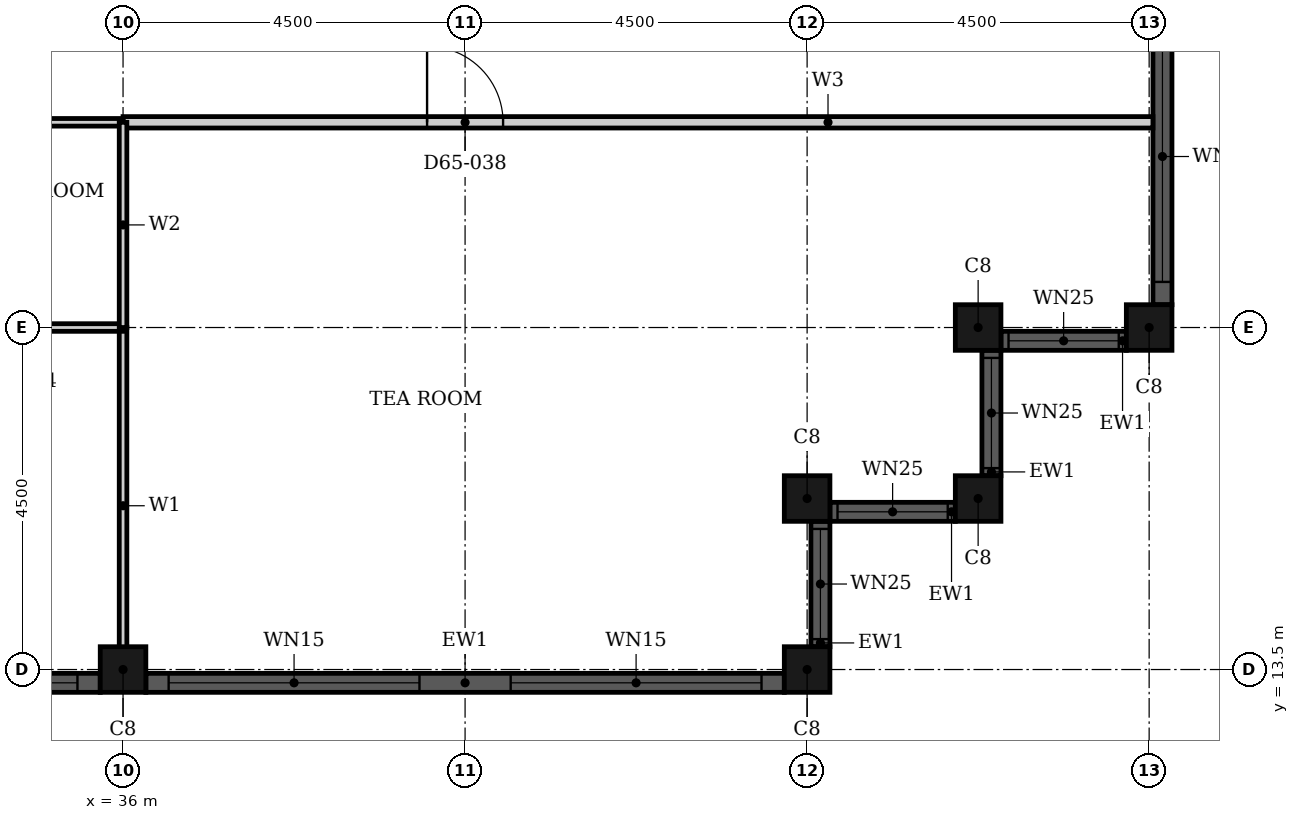
"""IFC4 building model, lengths in metres.
Left out: names, types, materials, properties, quantities, classifications, styles, units other than length and angle.
Written with IfcOpenShell. Run it as: python <this file> out.ifc"""

import sys

from ifc_helpers import new_model, si_unit, direction, frame, frame_2d, origin, origin_2d, place, context, subcontext, project, spatial, rectangle, hollow_rectangle, extrude, element, fill, save


model = new_model("IFC4")
c1 = context("Model", 3, precision=1e-05, world=origin(), true_north=direction((0.0, 1.0)))
c2 = subcontext(c1, "Body", "Model", "MODEL_VIEW")
j1 = project(units=[si_unit("LENGTHUNIT", "METRE"), si_unit("PLANEANGLEUNIT", "RADIAN")], contexts=[c1])
p1 = place(None, origin())
s1 = spatial("IfcSite", under=j1, at=p1, CompositionType="ELEMENT")
p2 = place(p1, origin())
s2 = spatial("IfcBuilding", under=s1, at=p2, CompositionType="ELEMENT")
p3 = place(p2, frame((0.0, 0.0, 256.4)))
s3 = spatial("IfcBuildingStorey", under=s2, at=p3, CompositionType="ELEMENT", Elevation=256.4)
for number, where, z_axis, x_axis in (
    (1, (36.0, 13.5, 0.0), (0.0, 0.0, 1.0), (1.0, 0.0, 0.0)),
    (2, (45.0, 13.5, 0.0), (0.0, 0.0, 1.0), (1.0, 0.0, 0.0)),
    (3, (45.0, 15.75, 0.0), (0.0, 0.0, 1.0), (1.0, 0.0, 0.0)),
    (4, (47.25, 15.75, 0.0), (0.0, 0.0, 1.0), (1.0, 0.0, 0.0)),
    (5, (47.25, 18.0, 0.0), (0.0, 0.0, 1.0), (1.0, 0.0, 0.0)),
    (6, (49.5, 18.0, 0.0), (0.0, 0.0, 1.0), (1.0, 0.0, 0.0)),
):
    element("IfcColumn", number, at=place(p3, frame(where, z_axis=z_axis, x_axis=x_axis)), inside=s3, PredefinedType="COLUMN", context=c2, shape_type="SweptSolid", body=[
        extrude(hollow_rectangle(XDim=0.6, YDim=0.6, WallThickness=0.02, at=origin_2d()), origin(), (0.0, 0.0, 1.0), 3.7),
    ])
p4 = place(p3, frame((27.3, 13.325, 0.0), z_axis=(0.0, 0.0, 1.0), x_axis=(1.0, 0.0, 0.0)))
e7 = element("IfcWall", 7, at=p4, inside=s3, PredefinedType="SOLIDWALL", context=c2, shape_type="SweptSolid", body=[
    extrude(rectangle(XDim=8.4, YDim=0.25, at=frame_2d((4.2, 0.0))), origin(), (0.0, 0.0, 1.0), 3.7),
])
p5 = place(p4, frame((0.3, 0.0, 0.45)))
e8 = element("IfcOpeningElement", 8, at=p5, cuts=e7, PredefinedType="OPENING", context=c2, shape_type="SweptSolid", body=[
    extrude(rectangle(XDim=3.3, YDim=2.3, at=frame_2d((1.65, 1.15))), frame((0.0, 0.135, 0.0), z_axis=(0.0, -1.0, 0.0), x_axis=(1.0, 0.0, 0.0)), (0.0, 0.0, 1.0), 0.27),
])
p6 = place(p4, frame((4.8, 0.0, 0.45)))
e9 = element("IfcOpeningElement", 9, at=p6, cuts=e7, PredefinedType="OPENING", context=c2, shape_type="SweptSolid", body=[
    extrude(rectangle(XDim=3.3, YDim=2.3, at=frame_2d((1.65, 1.15))), frame((0.0, 0.135, 0.0), z_axis=(0.0, -1.0, 0.0), x_axis=(1.0, 0.0, 0.0)), (0.0, 0.0, 1.0), 0.27),
])
p7 = place(p3, frame((36.3, 13.325, 0.0), z_axis=(0.0, 0.0, 1.0), x_axis=(1.0, 0.0, 0.0)))
e10 = element("IfcWall", 10, at=p7, inside=s3, PredefinedType="SOLIDWALL", context=c2, shape_type="SweptSolid", body=[
    extrude(rectangle(XDim=8.4, YDim=0.25, at=frame_2d((4.2, 0.0))), origin(), (0.0, 0.0, 1.0), 3.7),
])
p8 = place(p7, frame((0.3, 0.0, 0.45)))
e11 = element("IfcOpeningElement", 11, at=p8, cuts=e10, PredefinedType="OPENING", context=c2, shape_type="SweptSolid", body=[
    extrude(rectangle(XDim=3.3, YDim=2.3, at=frame_2d((1.65, 1.15))), frame((0.0, 0.135, 0.0), z_axis=(0.0, -1.0, 0.0), x_axis=(1.0, 0.0, 0.0)), (0.0, 0.0, 1.0), 0.27),
])
p9 = place(p7, frame((4.8, 0.0, 0.45)))
e12 = element("IfcOpeningElement", 12, at=p9, cuts=e10, PredefinedType="OPENING", context=c2, shape_type="SweptSolid", body=[
    extrude(rectangle(XDim=3.3, YDim=2.3, at=frame_2d((1.65, 1.15))), frame((0.0, 0.135, 0.0), z_axis=(0.0, -1.0, 0.0), x_axis=(1.0, 0.0, 0.0)), (0.0, 0.0, 1.0), 0.27),
])
p10 = place(p3, frame((45.175, 13.8, 0.0), z_axis=(0.0, 0.0, 1.0), x_axis=(0.0, 1.0, 0.0)))
e13 = element("IfcWall", 13, at=p10, inside=s3, PredefinedType="SOLIDWALL", context=c2, shape_type="SweptSolid", body=[
    extrude(rectangle(XDim=1.65, YDim=0.25, at=frame_2d((0.825, 0.0))), origin(), (0.0, 0.0, 1.0), 3.7),
])
p11 = place(p10, frame((0.1, 0.0, 0.9)))
e14 = element("IfcOpeningElement", 14, at=p11, cuts=e13, PredefinedType="OPENING", context=c2, shape_type="SweptSolid", body=[
    extrude(rectangle(XDim=1.45, YDim=1.85, at=frame_2d((0.725, 0.925))), frame((0.0, 0.135, 0.0), z_axis=(0.0, -1.0, 0.0), x_axis=(1.0, 0.0, 0.0)), (0.0, 0.0, 1.0), 0.27),
])
p12 = place(p3, frame((45.3, 15.575, 0.0), z_axis=(0.0, 0.0, 1.0), x_axis=(1.0, 0.0, 0.0)))
e15 = element("IfcWall", 15, at=p12, inside=s3, PredefinedType="SOLIDWALL", context=c2, shape_type="SweptSolid", body=[
    extrude(rectangle(XDim=1.65, YDim=0.25, at=frame_2d((0.825, 0.0))), origin(), (0.0, 0.0, 1.0), 3.7),
])
p13 = place(p12, frame((0.1, 0.0, 0.9)))
e16 = element("IfcOpeningElement", 16, at=p13, cuts=e15, PredefinedType="OPENING", context=c2, shape_type="SweptSolid", body=[
    extrude(rectangle(XDim=1.45, YDim=1.85, at=frame_2d((0.725, 0.925))), frame((0.0, 0.135, 0.0), z_axis=(0.0, -1.0, 0.0), x_axis=(1.0, 0.0, 0.0)), (0.0, 0.0, 1.0), 0.27),
])
p14 = place(p3, frame((47.425, 16.05, 0.0), z_axis=(0.0, 0.0, 1.0), x_axis=(0.0, 1.0, 0.0)))
e17 = element("IfcWall", 17, at=p14, inside=s3, PredefinedType="SOLIDWALL", context=c2, shape_type="SweptSolid", body=[
    extrude(rectangle(XDim=1.65, YDim=0.25, at=frame_2d((0.825, 0.0))), origin(), (0.0, 0.0, 1.0), 3.7),
])
p15 = place(p14, frame((0.1, 0.0, 0.9)))
e18 = element("IfcOpeningElement", 18, at=p15, cuts=e17, PredefinedType="OPENING", context=c2, shape_type="SweptSolid", body=[
    extrude(rectangle(XDim=1.45, YDim=1.85, at=frame_2d((0.725, 0.925))), frame((0.0, 0.135, 0.0), z_axis=(0.0, -1.0, 0.0), x_axis=(1.0, 0.0, 0.0)), (0.0, 0.0, 1.0), 0.27),
])
p16 = place(p3, frame((47.55, 17.825, 0.0), z_axis=(0.0, 0.0, 1.0), x_axis=(1.0, 0.0, 0.0)))
e19 = element("IfcWall", 19, at=p16, inside=s3, PredefinedType="SOLIDWALL", context=c2, shape_type="SweptSolid", body=[
    extrude(rectangle(XDim=1.65, YDim=0.25, at=frame_2d((0.825, 0.0))), origin(), (0.0, 0.0, 1.0), 3.7),
])
p17 = place(p16, frame((0.1, 0.0, 0.9)))
e20 = element("IfcOpeningElement", 20, at=p17, cuts=e19, PredefinedType="OPENING", context=c2, shape_type="SweptSolid", body=[
    extrude(rectangle(XDim=1.45, YDim=1.85, at=frame_2d((0.725, 0.925))), frame((0.0, 0.135, 0.0), z_axis=(0.0, -1.0, 0.0), x_axis=(1.0, 0.0, 0.0)), (0.0, 0.0, 1.0), 0.27),
])
p18 = place(p3, frame((49.675, 18.3, 0.0), z_axis=(0.0, 0.0, 1.0), x_axis=(0.0, 1.0, 0.0)))
e21 = element("IfcWall", 21, at=p18, inside=s3, PredefinedType="SOLIDWALL", context=c2, shape_type="SweptSolid", body=[
    extrude(rectangle(XDim=8.4, YDim=0.25, at=frame_2d((4.2, 0.0))), origin(), (0.0, 0.0, 1.0), 3.7),
])
p19 = place(p18, frame((0.3, 0.0, 0.45)))
e22 = element("IfcOpeningElement", 22, at=p19, cuts=e21, PredefinedType="OPENING", context=c2, shape_type="SweptSolid", body=[
    extrude(rectangle(XDim=3.3, YDim=2.3, at=frame_2d((1.65, 1.15))), frame((0.0, 0.135, 0.0), z_axis=(0.0, -1.0, 0.0), x_axis=(1.0, 0.0, 0.0)), (0.0, 0.0, 1.0), 0.27),
])
p20 = place(p18, frame((4.8, 0.0, 0.45)))
e23 = element("IfcOpeningElement", 23, at=p20, cuts=e21, PredefinedType="OPENING", context=c2, shape_type="SweptSolid", body=[
    extrude(rectangle(XDim=3.3, YDim=2.3, at=frame_2d((1.65, 1.15))), frame((0.0, 0.135, 0.0), z_axis=(0.0, -1.0, 0.0), x_axis=(1.0, 0.0, 0.0)), (0.0, 0.0, 1.0), 0.27),
])
p21 = place(p3, frame((36.0, 20.7, 0.0), z_axis=(0.0, 0.0, 1.0), x_axis=(1.0, 0.0, 0.0)))
e24 = element("IfcWall", 24, at=p21, inside=s3, PredefinedType="PARTITIONING", context=c2, shape_type="SweptSolid", body=[
    extrude(rectangle(XDim=13.55, YDim=0.15, at=frame_2d((6.775, 0.0))), origin(), (0.0, 0.0, 1.0), 3.4),
])
p22 = place(p21, frame((4.0, 0.0, 0.0)))
e25 = element("IfcOpeningElement", 25, at=p22, cuts=e24, PredefinedType="OPENING", context=c2, shape_type="SweptSolid", body=[
    extrude(rectangle(XDim=1.0, YDim=2.1, at=frame_2d((0.5, 1.05))), frame((0.0, 0.085, 0.0), z_axis=(0.0, -1.0, 0.0), x_axis=(1.0, 0.0, 0.0)), (0.0, 0.0, 1.0), 0.17),
])
p23 = place(p3, frame((36.0, 13.31, 0.0), z_axis=(0.0, 0.0, 1.0), x_axis=(0.0, 1.0, 0.0)))
e26 = element("IfcWall", 26, at=p23, inside=s3, PredefinedType="PARTITIONING", context=c2, shape_type="SweptSolid", body=[
    extrude(rectangle(XDim=4.69, YDim=0.1, at=frame_2d((2.345, 0.0))), origin(), (0.0, 0.0, 1.0), 3.4),
])
for number, where, z_axis, x_axis in (
    (27, (33.6, 18.0, 0.0), (0.0, 0.0, 1.0), (1.0, 0.0, 0.0)),
    (28, (33.6, 20.7, 0.0), (0.0, 0.0, 1.0), (1.0, 0.0, 0.0)),
):
    element("IfcWall", number, at=place(p3, frame(where, z_axis=z_axis, x_axis=x_axis)), inside=s3, PredefinedType="PARTITIONING", context=c2, shape_type="SweptSolid", body=[
        extrude(rectangle(XDim=2.4, YDim=0.1, at=frame_2d((1.2, 0.0))), origin(), (0.0, 0.0, 1.0), 3.4),
    ])
p24 = place(p3, frame((36.0, 18.0, 0.0), z_axis=(0.0, 0.0, 1.0), x_axis=(0.0, 1.0, 0.0)))
e29 = element("IfcWall", 29, at=p24, inside=s3, PredefinedType="PARTITIONING", context=c2, shape_type="SweptSolid", body=[
    extrude(rectangle(XDim=2.7, YDim=0.1, at=frame_2d((1.35, 0.0))), origin(), (0.0, 0.0, 1.0), 3.4),
])
p25 = place(p6, origin())
e30 = element("IfcWindow", 30, at=p25, inside=s3, PartitioningType="SINGLE_PANEL", PredefinedType="WINDOW", context=c2, shape_type="SweptSolid", body=[
    extrude(rectangle(XDim=3.3, YDim=2.3, at=frame_2d((1.65, 1.15))), frame((0.0, 0.03, 0.0), z_axis=(0.0, -1.0, 0.0), x_axis=(1.0, 0.0, 0.0)), (0.0, 0.0, 1.0), 0.06),
])
fill(e9, e30)
p26 = place(p8, origin())
e31 = element("IfcWindow", 31, at=p26, inside=s3, PartitioningType="SINGLE_PANEL", PredefinedType="WINDOW", context=c2, shape_type="SweptSolid", body=[
    extrude(rectangle(XDim=3.3, YDim=2.3, at=frame_2d((1.65, 1.15))), frame((0.0, 0.03, 0.0), z_axis=(0.0, -1.0, 0.0), x_axis=(1.0, 0.0, 0.0)), (0.0, 0.0, 1.0), 0.06),
])
fill(e11, e31)
p27 = place(p9, origin())
e32 = element("IfcWindow", 32, at=p27, inside=s3, PartitioningType="SINGLE_PANEL", PredefinedType="WINDOW", context=c2, shape_type="SweptSolid", body=[
    extrude(rectangle(XDim=3.3, YDim=2.3, at=frame_2d((1.65, 1.15))), frame((0.0, 0.03, 0.0), z_axis=(0.0, -1.0, 0.0), x_axis=(1.0, 0.0, 0.0)), (0.0, 0.0, 1.0), 0.06),
])
fill(e12, e32)
p28 = place(p11, origin())
e33 = element("IfcWindow", 33, at=p28, inside=s3, PartitioningType="SINGLE_PANEL", PredefinedType="WINDOW", context=c2, shape_type="SweptSolid", body=[
    extrude(rectangle(XDim=1.45, YDim=1.85, at=frame_2d((0.725, 0.925))), frame((0.0, 0.03, 0.0), z_axis=(0.0, -1.0, 0.0), x_axis=(1.0, 0.0, 0.0)), (0.0, 0.0, 1.0), 0.06),
])
fill(e14, e33)
p29 = place(p13, origin())
e34 = element("IfcWindow", 34, at=p29, inside=s3, PartitioningType="SINGLE_PANEL", PredefinedType="WINDOW", context=c2, shape_type="SweptSolid", body=[
    extrude(rectangle(XDim=1.45, YDim=1.85, at=frame_2d((0.725, 0.925))), frame((0.0, 0.03, 0.0), z_axis=(0.0, -1.0, 0.0), x_axis=(1.0, 0.0, 0.0)), (0.0, 0.0, 1.0), 0.06),
])
fill(e16, e34)
p30 = place(p15, origin())
e35 = element("IfcWindow", 35, at=p30, inside=s3, PartitioningType="SINGLE_PANEL", PredefinedType="WINDOW", context=c2, shape_type="SweptSolid", body=[
    extrude(rectangle(XDim=1.45, YDim=1.85, at=frame_2d((0.725, 0.925))), frame((0.0, 0.03, 0.0), z_axis=(0.0, -1.0, 0.0), x_axis=(1.0, 0.0, 0.0)), (0.0, 0.0, 1.0), 0.06),
])
fill(e18, e35)
p31 = place(p17, origin())
e36 = element("IfcWindow", 36, at=p31, inside=s3, PartitioningType="SINGLE_PANEL", PredefinedType="WINDOW", context=c2, shape_type="SweptSolid", body=[
    extrude(rectangle(XDim=1.45, YDim=1.85, at=frame_2d((0.725, 0.925))), frame((0.0, 0.03, 0.0), z_axis=(0.0, -1.0, 0.0), x_axis=(1.0, 0.0, 0.0)), (0.0, 0.0, 1.0), 0.06),
])
fill(e20, e36)
p32 = place(p19, origin())
e37 = element("IfcWindow", 37, at=p32, inside=s3, PartitioningType="SINGLE_PANEL", PredefinedType="WINDOW", context=c2, shape_type="SweptSolid", body=[
    extrude(rectangle(XDim=3.3, YDim=2.3, at=frame_2d((1.65, 1.15))), frame((0.0, 0.03, 0.0), z_axis=(0.0, -1.0, 0.0), x_axis=(1.0, 0.0, 0.0)), (0.0, 0.0, 1.0), 0.06),
])
fill(e22, e37)
p33 = place(p22, origin())
e38 = element("IfcDoor", 38, at=p33, inside=s3, OperationType="SINGLE_SWING_RIGHT", PredefinedType="DOOR", context=c2, shape_type="SweptSolid", body=[
    extrude(rectangle(XDim=1.0, YDim=2.1, at=frame_2d((0.5, 1.05))), frame((0.0, 0.025, 0.0), z_axis=(0.0, -1.0, 0.0), x_axis=(1.0, 0.0, 0.0)), (0.0, 0.0, 1.0), 0.05),
])
fill(e25, e38)
save(model, sys.argv[1])
